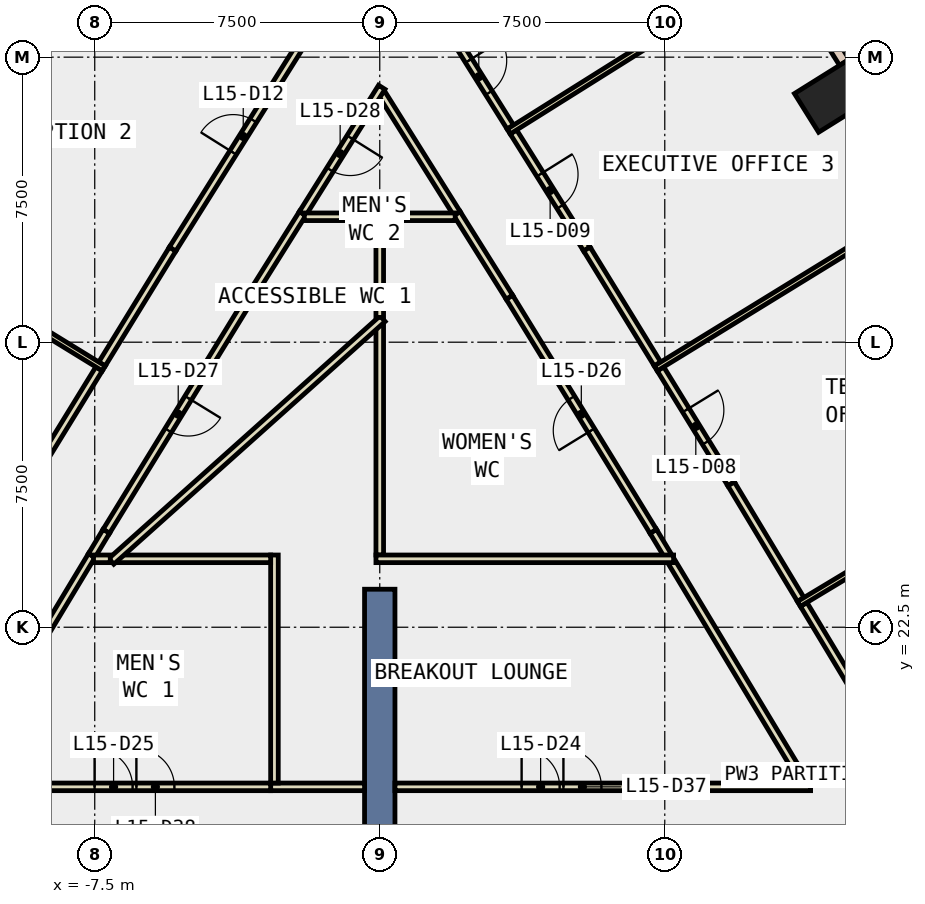
"""IFC4 building model, lengths in metres.
Left out: names, types, materials, properties, quantities, classifications, styles, units other than length and angle.
Written with IfcOpenShell. Run it as: python <this file> out.ifc"""

import sys

from ifc_helpers import new_model, si_unit, direction, frame, frame_2d, origin, origin_2d, place, context, subcontext, project, spatial, rectangle, extrude, element, fill, save


model = new_model("IFC4")
c1 = context("Model", 3, precision=1e-05, world=origin(), true_north=direction((0.0, 1.0)))
c2 = subcontext(c1, "Body", "Model", "MODEL_VIEW")
j1 = project(units=[si_unit("LENGTHUNIT", "METRE"), si_unit("PLANEANGLEUNIT", "RADIAN")], contexts=[c1])
p1 = place(None, origin())
s1 = spatial("IfcSite", under=j1, at=p1, CompositionType="ELEMENT")
p2 = place(p1, origin())
s2 = spatial("IfcBuilding", under=s1, at=p2, CompositionType="ELEMENT")
p3 = place(p2, frame((0.0, 0.0, 72.8)))
s3 = spatial("IfcBuildingStorey", under=s2, at=p3, CompositionType="ELEMENT", Elevation=72.8)
p4 = place(p3, frame((11.909, 36.457, -0.4), z_axis=(0.0, 0.0, 1.0), x_axis=(-0.530067268476, 0.847955594881, 0.0)))
e1 = element("IfcColumn", 1, at=p4, inside=s3, PredefinedType="COLUMN", context=c2, shape_type="SweptSolid", body=[
    extrude(rectangle(XDim=1.2, YDim=1.6, at=origin_2d()), origin(), (0.0, 0.0, 1.0), 4.2),
])
p5 = place(p3, frame((0.0, 14.5, -0.4), z_axis=(0.0, 0.0, 1.0), x_axis=(0.0, 1.0, 0.0)))
e2 = element("IfcWall", 2, at=p5, inside=s3, PredefinedType="SHEAR", context=c2, shape_type="SweptSolid", body=[
    extrude(rectangle(XDim=9.0, YDim=0.8, at=frame_2d((4.5, 0.0))), origin(), (0.0, 0.0, 1.0), 4.2),
])
p6 = place(p3, frame((12.227, 37.362, 0.0), z_axis=(0.0, 0.0, 1.0), x_axis=(-0.531357111884, 0.847147932565, 0.0)))
e3 = element("IfcWall", 3, at=p6, inside=s3, PredefinedType="STANDARD", context=c2, shape_type="SweptSolid", body=[
    extrude(rectangle(XDim=6.282, YDim=0.3, at=frame_2d((3.141, 0.0))), origin(), (0.0, 0.0, 1.0), 3.8),
])
p7 = place(p6, frame((0.571, 0.0, 0.9)))
e4 = element("IfcOpeningElement", 4, at=p7, cuts=e3, PredefinedType="OPENING", context=c2, shape_type="SweptSolid", body=[
    extrude(rectangle(XDim=2.0, YDim=2.6, at=frame_2d((1.0, 1.3))), frame((0.0, 0.16, 0.0), z_axis=(0.0, -1.0, 0.0), x_axis=(1.0, 0.0, 0.0)), (0.0, 0.0, 1.0), 0.32),
])
p8 = place(p6, frame((3.712, 0.0, 0.9)))
e5 = element("IfcOpeningElement", 5, at=p8, cuts=e3, PredefinedType="OPENING", context=c2, shape_type="SweptSolid", body=[
    extrude(rectangle(XDim=2.0, YDim=2.6, at=frame_2d((1.0, 1.3))), frame((0.0, 0.16, 0.0), z_axis=(0.0, -1.0, 0.0), x_axis=(1.0, 0.0, 0.0)), (0.0, 0.0, 1.0), 0.32),
])
p9 = place(p3, frame((11.186, 18.386, 0.0), z_axis=(0.0, 0.0, 1.0), x_axis=(-0.507247363226, 0.861800506208, 0.0)))
e6 = element("IfcWall", 6, at=p9, inside=s3, PredefinedType="PARTITIONING", context=c2, shape_type="SweptSolid", body=[
    extrude(rectangle(XDim=0.516, YDim=0.2, at=frame_2d((0.258, 0.0))), origin(), (0.0, 0.0, 1.0), 3.8),
])
p10 = place(p3, frame((10.924, 18.831, 0.0), z_axis=(0.0, 0.0, 1.0), x_axis=(-0.515797941416, 0.856710268195, 0.0)))
e7 = element("IfcWall", 7, at=p10, inside=s3, PredefinedType="PARTITIONING", context=c2, shape_type="SweptSolid", body=[
    extrude(rectangle(XDim=6.283, YDim=0.2, at=frame_2d((3.142, 0.0))), origin(), (0.0, 0.0, 1.0), 3.8),
])
p11 = place(p3, frame((-7.58, 24.386, 0.0), z_axis=(0.0, 0.0, 1.0), x_axis=(-0.51574664882, -0.85674114774, 0.0)))
e8 = element("IfcWall", 8, at=p11, inside=s3, PredefinedType="PARTITIONING", context=c2, shape_type="SweptSolid", body=[
    extrude(rectangle(XDim=6.484, YDim=0.2, at=frame_2d((3.242, 0.0))), origin(), (0.0, 0.0, 1.0), 3.8),
])
p12 = place(p3, frame((7.58, 24.386, 0.0), z_axis=(0.0, 0.0, 1.0), x_axis=(-0.515748848873, 0.856739823334, 0.0)))
e9 = element("IfcWall", 9, at=p12, inside=s3, PredefinedType="PARTITIONING", context=c2, shape_type="SweptSolid", body=[
    extrude(rectangle(XDim=0.745, YDim=0.2, at=frame_2d((0.372, 0.0))), origin(), (0.0, 0.0, 1.0), 3.8),
])
p13 = place(p3, frame((7.196, 25.024, 0.0), z_axis=(0.0, 0.0, 1.0), x_axis=(-0.523464329994, 0.852047589765, 0.0)))
e10 = element("IfcWall", 10, at=p13, inside=s3, PredefinedType="PARTITIONING", context=c2, shape_type="SweptSolid", body=[
    extrude(rectangle(XDim=7.231, YDim=0.2, at=frame_2d((3.615, 0.0))), origin(), (0.0, 0.0, 1.0), 3.8),
])
p14 = place(p13, frame((3.115, 0.0, 0.0)))
e11 = element("IfcOpeningElement", 11, at=p14, cuts=e10, PredefinedType="OPENING", context=c2, shape_type="SweptSolid", body=[
    extrude(rectangle(XDim=1.0, YDim=2.1, at=frame_2d((0.5, 1.05))), frame((0.0, 0.11, 0.0), z_axis=(0.0, -1.0, 0.0), x_axis=(1.0, 0.0, 0.0)), (0.0, 0.0, 1.0), 0.22),
])
for number, where, z_axis, x_axis in (
    (12, (3.411, 31.185, 0.0), (0.0, 0.0, 1.0), (-0.531, 0.847, 0.0)),
    (13, (-2.031, 33.385, 0.0), (0.0, 0.0, 1.0), (-0.531, -0.847, 0.0)),
):
    element("IfcWall", number, at=place(p3, frame(where, z_axis=z_axis, x_axis=x_axis)), inside=s3, PredefinedType="PARTITIONING", context=c2, shape_type="SweptSolid", body=[
        extrude(rectangle(XDim=2.597, YDim=0.2, at=frame_2d((1.298, 0.0))), origin(), (0.0, 0.0, 1.0), 3.8),
    ])
p15 = place(p3, frame((-3.411, 31.185, 0.0), z_axis=(0.0, 0.0, 1.0), x_axis=(-0.523464329994, -0.852047589765, 0.0)))
e14 = element("IfcWall", 14, at=p15, inside=s3, PredefinedType="PARTITIONING", context=c2, shape_type="SweptSolid", body=[
    extrude(rectangle(XDim=7.231, YDim=0.2, at=frame_2d((3.615, 0.0))), origin(), (0.0, 0.0, 1.0), 3.8),
])
p16 = place(p15, frame((3.115, 0.0, 0.0)))
e15 = element("IfcOpeningElement", 15, at=p16, cuts=e14, PredefinedType="OPENING", context=c2, shape_type="SweptSolid", body=[
    extrude(rectangle(XDim=1.0, YDim=2.1, at=frame_2d((0.5, 1.05))), frame((0.0, 0.11, 0.0), z_axis=(0.0, -1.0, 0.0), x_axis=(1.0, 0.0, 0.0)), (0.0, 0.0, 1.0), 0.22),
])
p17 = place(p3, frame((-7.196, 25.024, 0.0), z_axis=(0.0, 0.0, 1.0), x_axis=(-0.515748848873, -0.856739823334, 0.0)))
e16 = element("IfcWall", 16, at=p17, inside=s3, PredefinedType="PARTITIONING", context=c2, shape_type="SweptSolid", body=[
    extrude(rectangle(XDim=0.745, YDim=0.2, at=frame_2d((0.372, 0.0))), origin(), (0.0, 0.0, 1.0), 3.8),
])
p18 = place(p3, frame((2.031, 33.385, 0.0), z_axis=(0.0, 0.0, 1.0), x_axis=(-0.53130100335, 0.847183122967, 0.0)))
e17 = element("IfcWall", 17, at=p18, inside=s3, PredefinedType="PARTITIONING", context=c2, shape_type="SweptSolid", body=[
    extrude(rectangle(XDim=3.723, YDim=0.2, at=frame_2d((1.861, 0.0))), origin(), (0.0, 0.0, 1.0), 3.8),
])
p19 = place(p3, frame((0.053, 36.708, 0.0), z_axis=(0.0, 0.0, 1.0), x_axis=(-0.53130190932, -0.847182554797, 0.0)))
e18 = element("IfcWall", 18, at=p19, inside=s3, PredefinedType="PARTITIONING", context=c2, shape_type="SweptSolid", body=[
    extrude(rectangle(XDim=3.922, YDim=0.2, at=frame_2d((1.961, 0.0))), origin(), (0.0, 0.0, 1.0), 3.8),
])
p20 = place(p19, frame((1.562, 0.0, 0.0)))
e19 = element("IfcOpeningElement", 19, at=p20, cuts=e18, PredefinedType="OPENING", context=c2, shape_type="SweptSolid", body=[
    extrude(rectangle(XDim=1.0, YDim=2.1, at=frame_2d((0.5, 1.05))), frame((0.0, 0.11, 0.0), z_axis=(0.0, -1.0, 0.0), x_axis=(1.0, 0.0, 0.0)), (0.0, 0.0, 1.0), 0.22),
])
p21 = place(p3, frame((11.156, 23.1, 0.0), z_axis=(0.0, 0.0, 1.0), x_axis=(0.515628270719, -0.856812398623, 0.0)))
e20 = element("IfcWall", 20, at=p21, inside=s3, PredefinedType="PARTITIONING", context=c2, shape_type="SweptSolid", body=[
    extrude(rectangle(XDim=3.549, YDim=0.2, at=frame_2d((1.775, 0.0))), origin(), (0.0, 0.0, 1.0), 3.8),
])
p22 = place(p3, frame((7.387, 29.298, 0.0), z_axis=(0.0, 0.0, 1.0), x_axis=(0.523341833043, -0.852122834917, 0.0)))
e21 = element("IfcWall", 21, at=p22, inside=s3, PredefinedType="PARTITIONING", context=c2, shape_type="SweptSolid", body=[
    extrude(rectangle(XDim=3.552, YDim=0.2, at=frame_2d((1.776, 0.0))), origin(), (0.0, 0.0, 1.0), 3.8),
])
p23 = place(p22, frame((1.276, 0.0, 0.0)))
e22 = element("IfcOpeningElement", 22, at=p23, cuts=e21, PredefinedType="OPENING", context=c2, shape_type="SweptSolid", body=[
    extrude(rectangle(XDim=1.0, YDim=2.1, at=frame_2d((0.5, 1.05))), frame((0.0, 0.11, 0.0), z_axis=(0.0, -1.0, 0.0), x_axis=(1.0, 0.0, 0.0)), (0.0, 0.0, 1.0), 0.22),
])
p24 = place(p3, frame((9.246, 26.271, 0.0), z_axis=(0.0, 0.0, 1.0), x_axis=(0.515738557296, -0.856746018677, 0.0)))
e23 = element("IfcWall", 23, at=p24, inside=s3, PredefinedType="PARTITIONING", context=c2, shape_type="SweptSolid", body=[
    extrude(rectangle(XDim=3.552, YDim=0.2, at=frame_2d((1.776, 0.0))), origin(), (0.0, 0.0, 1.0), 3.8),
])
p25 = place(p3, frame((3.517, 35.533, 0.0), z_axis=(0.0, 0.0, 1.0), x_axis=(0.531301282969, -0.847182947607, 0.0)))
e24 = element("IfcWall", 24, at=p25, inside=s3, PredefinedType="PARTITIONING", context=c2, shape_type="SweptSolid", body=[
    extrude(rectangle(XDim=3.638, YDim=0.2, at=frame_2d((1.819, 0.0))), origin(), (0.0, 0.0, 1.0), 3.8),
])
p26 = place(p25, frame((1.319, 0.0, 0.0)))
e25 = element("IfcOpeningElement", 25, at=p26, cuts=e24, PredefinedType="OPENING", context=c2, shape_type="SweptSolid", body=[
    extrude(rectangle(XDim=1.0, YDim=2.1, at=frame_2d((0.5, 1.05))), frame((0.0, 0.11, 0.0), z_axis=(0.0, -1.0, 0.0), x_axis=(1.0, 0.0, 0.0)), (0.0, 0.0, 1.0), 0.22),
])
p27 = place(p3, frame((5.45, 32.451, 0.0), z_axis=(0.0, 0.0, 1.0), x_axis=(0.523617783711, -0.851953294836, 0.0)))
e26 = element("IfcWall", 26, at=p27, inside=s3, PredefinedType="PARTITIONING", context=c2, shape_type="SweptSolid", body=[
    extrude(rectangle(XDim=3.551, YDim=0.2, at=frame_2d((1.775, 0.0))), origin(), (0.0, 0.0, 1.0), 3.8),
])
p28 = place(p3, frame((1.775, 38.31, 0.0), z_axis=(0.0, 0.0, 1.0), x_axis=(0.531324164807, -0.847168597088, 0.0)))
e27 = element("IfcWall", 27, at=p28, inside=s3, PredefinedType="PARTITIONING", context=c2, shape_type="SweptSolid", body=[
    extrude(rectangle(XDim=3.128, YDim=0.2, at=frame_2d((1.564, 0.0))), origin(), (0.0, 0.0, 1.0), 3.8),
])
p29 = place(p28, frame((1.064, 0.0, 0.0)))
e28 = element("IfcOpeningElement", 28, at=p29, cuts=e27, PredefinedType="OPENING", context=c2, shape_type="SweptSolid", body=[
    extrude(rectangle(XDim=1.0, YDim=2.1, at=frame_2d((0.5, 1.05))), frame((0.0, 0.11, 0.0), z_axis=(0.0, -1.0, 0.0), x_axis=(1.0, 0.0, 0.0)), (0.0, 0.0, 1.0), 0.22),
])
p30 = place(p3, frame((-7.309, 29.426, 0.0), z_axis=(0.0, 0.0, 1.0), x_axis=(0.523617783711, 0.851953294836, 0.0)))
e29 = element("IfcWall", 29, at=p30, inside=s3, PredefinedType="PARTITIONING", context=c2, shape_type="SweptSolid", body=[
    extrude(rectangle(XDim=3.551, YDim=0.2, at=frame_2d((1.775, 0.0))), origin(), (0.0, 0.0, 1.0), 3.8),
])
p31 = place(p3, frame((-5.45, 32.451, 0.0), z_axis=(0.0, 0.0, 1.0), x_axis=(0.531388870359, 0.847128011849, 0.0)))
e30 = element("IfcWall", 30, at=p31, inside=s3, PredefinedType="PARTITIONING", context=c2, shape_type="SweptSolid", body=[
    extrude(rectangle(XDim=6.991, YDim=0.2, at=frame_2d((3.495, 0.0))), origin(), (0.0, 0.0, 1.0), 3.8),
])
p32 = place(p31, frame((2.996, 0.0, 0.0)))
e31 = element("IfcOpeningElement", 31, at=p32, cuts=e30, PredefinedType="OPENING", context=c2, shape_type="SweptSolid", body=[
    extrude(rectangle(XDim=1.0, YDim=2.1, at=frame_2d((0.5, 1.05))), frame((0.0, 0.11, 0.0), z_axis=(0.0, -1.0, 0.0), x_axis=(1.0, 0.0, 0.0)), (0.0, 0.0, 1.0), 0.22),
])
p33 = place(p3, frame((-9.246, 26.271, 0.0), z_axis=(0.0, 0.0, 1.0), x_axis=(0.523341833043, 0.852122834917, 0.0)))
e32 = element("IfcWall", 32, at=p33, inside=s3, PredefinedType="PARTITIONING", context=c2, shape_type="SweptSolid", body=[
    extrude(rectangle(XDim=3.552, YDim=0.2, at=frame_2d((1.776, 0.0))), origin(), (0.0, 0.0, 1.0), 3.8),
])
p34 = place(p3, frame((-2.871, 18.3, 0.0), z_axis=(0.0, 0.0, 1.0), x_axis=(1.0, 0.0, 0.0)))
e33 = element("IfcWall", 33, at=p34, inside=s3, PredefinedType="PARTITIONING", context=c2, shape_type="SweptSolid", body=[
    extrude(rectangle(XDim=2.471, YDim=0.2, at=frame_2d((1.236, 0.0))), origin(), (0.0, 0.0, 1.0), 3.8),
])
p35 = place(p3, frame((-11.337, 18.3, 0.0), z_axis=(0.0, 0.0, 1.0), x_axis=(1.0, 0.0, 0.0)))
e34 = element("IfcWall", 34, at=p35, inside=s3, PredefinedType="PARTITIONING", context=c2, shape_type="SweptSolid", body=[
    extrude(rectangle(XDim=8.466, YDim=0.2, at=frame_2d((4.233, 0.0))), origin(), (0.0, 0.0, 1.0), 3.8),
])
p36 = place(p35, frame((3.833, 0.0, 0.0)))
e35 = element("IfcOpeningElement", 35, at=p36, cuts=e34, PredefinedType="OPENING", context=c2, shape_type="SweptSolid", body=[
    extrude(rectangle(XDim=1.0, YDim=2.1, at=frame_2d((0.5, 1.05))), frame((0.0, 0.11, 0.0), z_axis=(0.0, -1.0, 0.0), x_axis=(1.0, 0.0, 0.0)), (0.0, 0.0, 1.0), 0.22),
])
p37 = place(p35, frame((4.933, 0.0, 0.0)))
e36 = element("IfcOpeningElement", 36, at=p37, cuts=e34, PredefinedType="OPENING", context=c2, shape_type="SweptSolid", body=[
    extrude(rectangle(XDim=1.0, YDim=2.1, at=frame_2d((0.5, 1.05))), frame((0.0, 0.11, 0.0), z_axis=(0.0, -1.0, 0.0), x_axis=(1.0, 0.0, 0.0)), (0.0, 0.0, 1.0), 0.22),
])
p38 = place(p3, frame((-2.771, 18.4, 0.0), z_axis=(0.0, 0.0, 1.0), x_axis=(0.0, 1.0, 0.0)))
e37 = element("IfcWall", 37, at=p38, inside=s3, PredefinedType="PARTITIONING", context=c2, shape_type="SweptSolid", body=[
    extrude(rectangle(XDim=6.0, YDim=0.2, at=frame_2d((3.0, 0.0))), origin(), (0.0, 0.0, 1.0), 3.8),
])
p39 = place(p3, frame((-2.871, 24.3, 0.0), z_axis=(0.0, 0.0, 1.0), x_axis=(-1.0, 0.0, 0.0)))
e38 = element("IfcWall", 38, at=p39, inside=s3, PredefinedType="PARTITIONING", context=c2, shape_type="SweptSolid", body=[
    extrude(rectangle(XDim=4.02, YDim=0.2, at=frame_2d((2.01, 0.0))), origin(), (0.0, 0.0, 1.0), 3.8),
])
p40 = place(p3, frame((0.0, 30.452, 0.0), z_axis=(0.0, 0.0, 1.0), x_axis=(0.0, -1.0, 0.0)))
e39 = element("IfcWall", 39, at=p40, inside=s3, PredefinedType="PARTITIONING", context=c2, shape_type="SweptSolid", body=[
    extrude(rectangle(XDim=6.052, YDim=0.2, at=frame_2d((3.026, 0.0))), origin(), (0.0, 0.0, 1.0), 3.8),
])
p41 = place(p3, frame((-0.1, 24.3, 0.0), z_axis=(0.0, 0.0, 1.0), x_axis=(1.0, 0.0, 0.0)))
e40 = element("IfcWall", 40, at=p41, inside=s3, PredefinedType="PARTITIONING", context=c2, shape_type="SweptSolid", body=[
    extrude(rectangle(XDim=7.832, YDim=0.2, at=frame_2d((3.916, 0.0))), origin(), (0.0, 0.0, 1.0), 3.8),
])
p42 = place(p3, frame((-7.065, 24.233, 0.0), z_axis=(0.0, 0.0, 1.0), x_axis=(0.745362618546, 0.666659258448, 0.0)))
e41 = element("IfcWall", 41, at=p42, inside=s3, PredefinedType="PARTITIONING", context=c2, shape_type="SweptSolid", body=[
    extrude(rectangle(XDim=9.579, YDim=0.2, at=frame_2d((4.79, 0.0))), origin(), (0.0, 0.0, 1.0), 3.8),
])
p43 = place(p3, frame((-7.532, 24.3, 0.0), z_axis=(0.0, 0.0, 1.0), x_axis=(1.0, 0.0, 0.0)))
e42 = element("IfcWall", 42, at=p43, inside=s3, PredefinedType="PARTITIONING", context=c2, shape_type="SweptSolid", body=[
    extrude(rectangle(XDim=0.441, YDim=0.2, at=frame_2d((0.22, 0.0))), origin(), (0.0, 0.0, 1.0), 3.8),
])
p44 = place(p3, frame((0.0, 30.652, 0.0), z_axis=(0.0, 0.0, 1.0), x_axis=(0.0, 1.0, 0.0)))
e43 = element("IfcWall", 43, at=p44, inside=s3, PredefinedType="PARTITIONING", context=c2, shape_type="SweptSolid", body=[
    extrude(rectangle(XDim=2.748, YDim=0.2, at=frame_2d((1.374, 0.0))), origin(), (0.0, 0.0, 1.0), 3.8),
])
for number, where, z_axis, x_axis in (
    (44, (0.1, 33.3, 0.0), (0.0, 0.0, 1.0), (1.0, 0.0, 0.0)),
    (45, (-1.985, 33.3, 0.0), (0.0, 0.0, 1.0), (1.0, 0.0, 0.0)),
):
    element("IfcWall", number, at=place(p3, frame(where, z_axis=z_axis, x_axis=x_axis)), inside=s3, PredefinedType="PARTITIONING", context=c2, shape_type="SweptSolid", body=[
        extrude(rectangle(XDim=1.885, YDim=0.2, at=frame_2d((0.942, 0.0))), origin(), (0.0, 0.0, 1.0), 3.8),
    ])
p45 = place(p3, frame((11.031, 23.113, 0.0), z_axis=(0.0, 0.0, 1.0), x_axis=(0.856780947164, 0.515680529568, 0.0)))
e46 = element("IfcWall", 46, at=p45, inside=s3, PredefinedType="PARTITIONING", context=c2, shape_type="SweptSolid", body=[
    extrude(rectangle(XDim=8.3, YDim=0.15, at=frame_2d((4.15, 0.0))), origin(), (0.0, 0.0, 1.0), 3.8),
])
p46 = place(p3, frame((7.263, 29.31, 0.0), z_axis=(0.0, 0.0, 1.0), x_axis=(0.85208929269, 0.523396443706, 0.0)))
e47 = element("IfcWall", 47, at=p46, inside=s3, PredefinedType="PARTITIONING", context=c2, shape_type="SweptSolid", body=[
    extrude(rectangle(XDim=8.3, YDim=0.15, at=frame_2d((4.15, 0.0))), origin(), (0.0, 0.0, 1.0), 3.8),
])
p47 = place(p3, frame((3.393, 35.543, 0.0), z_axis=(0.0, 0.0, 1.0), x_axis=(0.847089858839, 0.531449688166, 0.0)))
e48 = element("IfcWall", 48, at=p47, inside=s3, PredefinedType="PARTITIONING", context=c2, shape_type="SweptSolid", body=[
    extrude(rectangle(XDim=8.3, YDim=0.15, at=frame_2d((4.15, 0.0))), origin(), (0.0, 0.0, 1.0), 3.8),
])
p48 = place(p3, frame((-7.263, 29.31, 0.0), z_axis=(0.0, 0.0, 1.0), x_axis=(-0.85208929269, 0.523396443706, 0.0)))
e49 = element("IfcWall", 49, at=p48, inside=s3, PredefinedType="PARTITIONING", context=c2, shape_type="SweptSolid", body=[
    extrude(rectangle(XDim=8.3, YDim=0.15, at=frame_2d((4.15, 0.0))), origin(), (0.0, 0.0, 1.0), 3.8),
])
p49 = place(p3, frame((0.4, 18.3, 0.0), z_axis=(0.0, 0.0, 1.0), x_axis=(1.0, 0.0, 0.0)))
e50 = element("IfcWall", 50, at=p49, inside=s3, PredefinedType="PARTITIONING", context=c2, shape_type="SweptSolid", body=[
    extrude(rectangle(XDim=10.937, YDim=0.2, at=frame_2d((5.469, 0.0))), origin(), (0.0, 0.0, 1.0), 3.8),
])
p50 = place(p49, frame((3.333, 0.0, 0.0)))
e51 = element("IfcOpeningElement", 51, at=p50, cuts=e50, PredefinedType="OPENING", context=c2, shape_type="SweptSolid", body=[
    extrude(rectangle(XDim=1.0, YDim=2.1, at=frame_2d((0.5, 1.05))), frame((0.0, 0.11, 0.0), z_axis=(0.0, -1.0, 0.0), x_axis=(1.0, 0.0, 0.0)), (0.0, 0.0, 1.0), 0.22),
])
p51 = place(p49, frame((4.433, 0.0, 0.0)))
e52 = element("IfcOpeningElement", 52, at=p51, cuts=e50, PredefinedType="OPENING", context=c2, shape_type="SweptSolid", body=[
    extrude(rectangle(XDim=1.0, YDim=2.1, at=frame_2d((0.5, 1.05))), frame((0.0, 0.11, 0.0), z_axis=(0.0, -1.0, 0.0), x_axis=(1.0, 0.0, 0.0)), (0.0, 0.0, 1.0), 0.22),
])
p52 = place(p23, origin())
e53 = element("IfcDoor", 53, at=p52, inside=s3, OperationType="SINGLE_SWING_RIGHT", PredefinedType="DOOR", context=c2, shape_type="SweptSolid", body=[
    extrude(rectangle(XDim=1.0, YDim=2.1, at=frame_2d((0.5, 1.05))), frame((0.0, 0.025, 0.0), z_axis=(0.0, -1.0, 0.0), x_axis=(1.0, 0.0, 0.0)), (0.0, 0.0, 1.0), 0.05),
])
fill(e22, e53)
p53 = place(p26, origin())
e54 = element("IfcDoor", 54, at=p53, inside=s3, OperationType="SINGLE_SWING_LEFT", PredefinedType="DOOR", context=c2, shape_type="SweptSolid", body=[
    extrude(rectangle(XDim=1.0, YDim=2.1, at=frame_2d((0.5, 1.05))), frame((0.0, 0.025, 0.0), z_axis=(0.0, -1.0, 0.0), x_axis=(1.0, 0.0, 0.0)), (0.0, 0.0, 1.0), 0.05),
])
fill(e25, e54)
p54 = place(p29, origin())
e55 = element("IfcDoor", 55, at=p54, inside=s3, OperationType="SINGLE_SWING_LEFT", PredefinedType="DOOR", context=c2, shape_type="SweptSolid", body=[
    extrude(rectangle(XDim=1.0, YDim=2.1, at=frame_2d((0.5, 1.05))), frame((0.0, 0.025, 0.0), z_axis=(0.0, -1.0, 0.0), x_axis=(1.0, 0.0, 0.0)), (0.0, 0.0, 1.0), 0.05),
])
fill(e28, e55)
p55 = place(p32, origin())
e56 = element("IfcDoor", 56, at=p55, inside=s3, OperationType="SINGLE_SWING_LEFT", PredefinedType="DOOR", context=c2, shape_type="SweptSolid", body=[
    extrude(rectangle(XDim=1.0, YDim=2.1, at=frame_2d((0.5, 1.05))), frame((0.0, 0.025, 0.0), z_axis=(0.0, -1.0, 0.0), x_axis=(1.0, 0.0, 0.0)), (0.0, 0.0, 1.0), 0.05),
])
fill(e31, e56)
p56 = place(p50, origin())
e57 = element("IfcDoor", 57, at=p56, inside=s3, OperationType="SINGLE_SWING_LEFT", PredefinedType="DOOR", context=c2, shape_type="SweptSolid", body=[
    extrude(rectangle(XDim=1.0, YDim=2.1, at=frame_2d((0.5, 1.05))), frame((0.0, 0.025, 0.0), z_axis=(0.0, -1.0, 0.0), x_axis=(1.0, 0.0, 0.0)), (0.0, 0.0, 1.0), 0.05),
])
fill(e51, e57)
p57 = place(p36, origin())
e58 = element("IfcDoor", 58, at=p57, inside=s3, OperationType="SINGLE_SWING_RIGHT", PredefinedType="DOOR", context=c2, shape_type="SweptSolid", body=[
    extrude(rectangle(XDim=1.0, YDim=2.1, at=frame_2d((0.5, 1.05))), frame((0.0, 0.025, 0.0), z_axis=(0.0, -1.0, 0.0), x_axis=(1.0, 0.0, 0.0)), (0.0, 0.0, 1.0), 0.05),
])
fill(e35, e58)
p58 = place(p14, origin())
e59 = element("IfcDoor", 59, at=p58, inside=s3, OperationType="SINGLE_SWING_LEFT", PredefinedType="DOOR", context=c2, shape_type="SweptSolid", body=[
    extrude(rectangle(XDim=1.0, YDim=2.1, at=frame_2d((0.5, 1.05))), frame((0.0, 0.025, 0.0), z_axis=(0.0, -1.0, 0.0), x_axis=(1.0, 0.0, 0.0)), (0.0, 0.0, 1.0), 0.05),
])
fill(e11, e59)
p59 = place(p16, origin())
e60 = element("IfcDoor", 60, at=p59, inside=s3, OperationType="SINGLE_SWING_LEFT", PredefinedType="DOOR", context=c2, shape_type="SweptSolid", body=[
    extrude(rectangle(XDim=1.0, YDim=2.1, at=frame_2d((0.5, 1.05))), frame((0.0, 0.025, 0.0), z_axis=(0.0, -1.0, 0.0), x_axis=(1.0, 0.0, 0.0)), (0.0, 0.0, 1.0), 0.05),
])
fill(e15, e60)
p60 = place(p20, origin())
e61 = element("IfcDoor", 61, at=p60, inside=s3, OperationType="SINGLE_SWING_LEFT", PredefinedType="DOOR", context=c2, shape_type="SweptSolid", body=[
    extrude(rectangle(XDim=1.0, YDim=2.1, at=frame_2d((0.5, 1.05))), frame((0.0, 0.025, 0.0), z_axis=(0.0, -1.0, 0.0), x_axis=(1.0, 0.0, 0.0)), (0.0, 0.0, 1.0), 0.05),
])
fill(e19, e61)
p61 = place(p51, origin())
e62 = element("IfcDoor", 62, at=p61, inside=s3, OperationType="SINGLE_SWING_RIGHT", PredefinedType="DOOR", context=c2, shape_type="SweptSolid", body=[
    extrude(rectangle(XDim=1.0, YDim=2.1, at=frame_2d((0.5, 1.05))), frame((0.0, 0.025, 0.0), z_axis=(0.0, -1.0, 0.0), x_axis=(1.0, 0.0, 0.0)), (0.0, 0.0, 1.0), 0.05),
])
fill(e52, e62)
p62 = place(p37, origin())
e63 = element("IfcDoor", 63, at=p62, inside=s3, OperationType="SINGLE_SWING_RIGHT", PredefinedType="DOOR", context=c2, shape_type="SweptSolid", body=[
    extrude(rectangle(XDim=1.0, YDim=2.1, at=frame_2d((0.5, 1.05))), frame((0.0, 0.025, 0.0), z_axis=(0.0, -1.0, 0.0), x_axis=(1.0, 0.0, 0.0)), (0.0, 0.0, 1.0), 0.05),
])
fill(e36, e63)
save(model, sys.argv[1])
